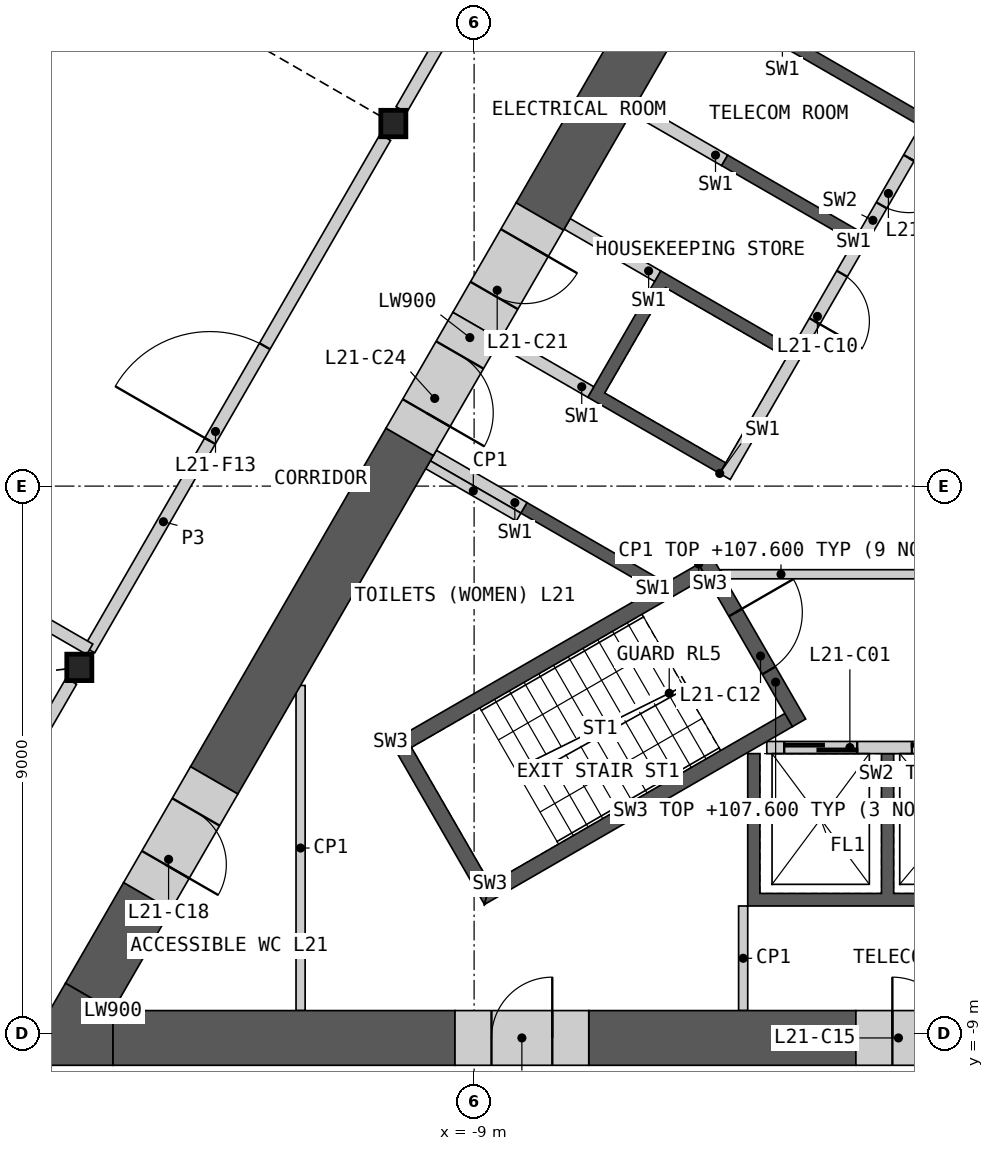
"""IFC4 building model, lengths in metres.
Left out: names, types, materials, properties, quantities, classifications, styles, units other than length and angle.
Written with IfcOpenShell. Run it as: python <this file> out.ifc"""

import sys

from ifc_helpers import new_model, si_unit, direction, frame, frame_2d, origin, origin_2d, place, context, subcontext, project, spatial, polyline, rectangle, i_section, outline, extrude, element, fill, save


model = new_model("IFC4")
c1 = context("Model", 3, precision=1e-05, world=origin(), true_north=direction((0.0, 1.0)))
c2 = subcontext(c1, "Body", "Model", "MODEL_VIEW")
j1 = project(units=[si_unit("LENGTHUNIT", "METRE"), si_unit("PLANEANGLEUNIT", "RADIAN")], contexts=[c1])
p1 = place(None, origin())
s1 = spatial("IfcSite", under=j1, at=p1, CompositionType="ELEMENT")
p2 = place(p1, origin())
s2 = spatial("IfcBuilding", under=s1, at=p2, CompositionType="ELEMENT")
p3 = place(p2, frame((0.0, 0.0, 103.8)))
s3 = spatial("IfcBuildingStorey", under=s2, at=p3, CompositionType="ELEMENT", Elevation=103.8)
for number, where, z_axis, x_axis in (
    (1, (-10.328, 5.963, 0.0), (0.0, 0.0, 1.0), (1.0, 0.0, 0.0)),
    (2, (-15.493, -2.982, 0.0), (0.0, 0.0, 1.0), (1.0, 0.0, 0.0)),
):
    element("IfcColumn", number, at=place(p3, frame(where, z_axis=z_axis, x_axis=x_axis)), inside=s3, PredefinedType="COLUMN", context=c2, shape_type="SweptSolid", body=[
        extrude(i_section(OverallWidth=0.412, OverallDepth=0.435, WebThickness=0.036, FlangeThickness=0.057, at=origin_2d()), origin(), (0.0, 0.0, 1.0), 4.2),
    ])
p4 = place(p3, origin())
e3 = element("IfcWall", 3, at=p4, inside=s3, PredefinedType="SHEAR", context=c2, shape_type="SweptSolid", body=[
    extrude(outline(polyline([(4.5, -4.4), (4.5, -6.906), (-4.5, -6.906), (-4.5, -4.4), (-4.3, -4.4), (-4.3, -6.7), (-2.3, -6.7), (-2.3, -4.4), (-2.1, -4.4), (-2.1, -6.7), (-0.1, -6.7), (-0.1, -4.4), (0.1, -4.4), (0.1, -6.7), (2.1, -6.7), (2.1, -4.4), (2.3, -4.4), (2.3, -6.7), (4.3, -6.7), (4.3, -4.4), (4.5, -4.4)])), origin(), (0.0, 0.0, 1.0), 3.8),
])
p5 = place(p3, frame((-4.187, -4.3, 0.0), z_axis=(0.0, 0.0, 1.0), x_axis=(1.0, 0.0, 0.0)))
e4 = element("IfcWall", 4, at=p5, inside=s3, PredefinedType="SOLIDWALL", context=c2, shape_type="SweptSolid", body=[
    extrude(rectangle(XDim=8.373, YDim=0.2, at=frame_2d((4.187, 0.0))), origin(), (0.0, 0.0, 1.0), 3.8),
])
p6 = place(p5, frame((0.287, 0.0, 0.0)))
e5 = element("IfcOpeningElement", 5, at=p6, cuts=e4, PredefinedType="OPENING", context=c2, shape_type="SweptSolid", body=[
    extrude(rectangle(XDim=1.2, YDim=2.1, at=frame_2d((0.6, 1.05))), frame((0.0, 0.11, 0.0), z_axis=(0.0, -1.0, 0.0), x_axis=(1.0, 0.0, 0.0)), (0.0, 0.0, 1.0), 0.22),
])
p7 = place(p5, frame((2.387, 0.0, 0.0)))
e6 = element("IfcOpeningElement", 6, at=p7, cuts=e4, PredefinedType="OPENING", context=c2, shape_type="SweptSolid", body=[
    extrude(rectangle(XDim=1.4, YDim=2.1, at=frame_2d((0.7, 1.05))), frame((0.0, 0.11, 0.0), z_axis=(0.0, -1.0, 0.0), x_axis=(1.0, 0.0, 0.0)), (0.0, 0.0, 1.0), 0.22),
])
p8 = place(p5, frame((4.737, 0.0, 0.0)))
e7 = element("IfcOpeningElement", 7, at=p8, cuts=e4, PredefinedType="OPENING", context=c2, shape_type="SweptSolid", body=[
    extrude(rectangle(XDim=1.1, YDim=2.1, at=frame_2d((0.55, 1.05))), frame((0.0, 0.11, 0.0), z_axis=(0.0, -1.0, 0.0), x_axis=(1.0, 0.0, 0.0)), (0.0, 0.0, 1.0), 0.22),
])
p9 = place(p5, frame((6.887, 0.0, 0.0)))
e8 = element("IfcOpeningElement", 8, at=p9, cuts=e4, PredefinedType="OPENING", context=c2, shape_type="SweptSolid", body=[
    extrude(rectangle(XDim=1.2, YDim=2.1, at=frame_2d((0.6, 1.05))), frame((0.0, 0.11, 0.0), z_axis=(0.0, -1.0, 0.0), x_axis=(1.0, 0.0, 0.0)), (0.0, 0.0, 1.0), 0.22),
])
p10 = place(p3, origin())
e9 = element("IfcWall", 9, at=p10, inside=s3, PredefinedType="SHEAR", context=c2, shape_type="SweptSolid", body=[
    extrude(outline(polyline([(-6.061, -1.697), (-8.231, -0.444), (-8.131, -0.271), (-5.96, -1.524), (-6.061, -1.697)])), origin(), (0.0, 0.0, 1.0), 3.8),
])
p11 = place(p3, origin())
e10 = element("IfcWall", 10, at=p11, inside=s3, PredefinedType="SHEAR", context=c2, shape_type="SweptSolid", body=[
    extrude(outline(polyline([(-4.96, 0.208), (-7.131, 1.461), (-5.931, 3.54), (-3.76, 2.287), (-3.861, 2.113), (-5.852, 3.263), (-6.852, 1.531), (-4.861, 0.381), (-4.96, 0.208)])), origin(), (0.0, 0.0, 1.0), 3.8),
])
p12 = place(p3, origin())
e11 = element("IfcWall", 11, at=p12, inside=s3, PredefinedType="SHEAR", context=c2, shape_type="SweptSolid", body=[
    extrude(outline(polyline([(-2.76, 4.019), (-4.931, 5.272), (-4.831, 5.445), (-2.66, 4.192), (-2.76, 4.019)])), origin(), (0.0, 0.0, 1.0), 3.8),
])
p13 = place(p3, origin())
e12 = element("IfcWall", 12, at=p13, inside=s3, PredefinedType="SHEAR", context=c2, shape_type="SweptSolid", body=[
    extrude(outline(polyline([(-3.731, 7.35), (-1.561, 6.097), (-1.66, 5.924), (-3.831, 7.177), (-3.731, 7.35)])), origin(), (0.0, 0.0, 1.0), 3.8),
])
p14 = place(p3, frame((-1.631, 5.776, 0.0), z_axis=(0.0, 0.0, 1.0), x_axis=(-0.499992876559, -0.866029516466, 0.0)))
e13 = element("IfcWall", 13, at=p14, inside=s3, PredefinedType="SOLIDWALL", context=c2, shape_type="SweptSolid", body=[
    extrude(rectangle(XDim=6.486, YDim=0.2, at=frame_2d((3.243, 0.0))), origin(), (0.0, 0.0, 1.0), 3.8),
])
p15 = place(p14, frame((0.437, 0.0, 0.0)))
e14 = element("IfcOpeningElement", 14, at=p15, cuts=e13, PredefinedType="OPENING", context=c2, shape_type="SweptSolid", body=[
    extrude(rectangle(XDim=0.9, YDim=2.1, at=frame_2d((0.45, 1.05))), frame((0.0, 0.11, 0.0), z_axis=(0.0, -1.0, 0.0), x_axis=(1.0, 0.0, 0.0)), (0.0, 0.0, 1.0), 0.22),
])
p16 = place(p14, frame((2.637, 0.0, 0.0)))
e15 = element("IfcOpeningElement", 15, at=p16, cuts=e13, PredefinedType="OPENING", context=c2, shape_type="SweptSolid", body=[
    extrude(rectangle(XDim=0.9, YDim=2.1, at=frame_2d((0.45, 1.05))), frame((0.0, 0.11, 0.0), z_axis=(0.0, -1.0, 0.0), x_axis=(1.0, 0.0, 0.0)), (0.0, 0.0, 1.0), 0.22),
])
p17 = place(p3, frame((-4.881, 5.358, 0.0), z_axis=(0.0, 0.0, 1.0), x_axis=(-0.866024871741, 0.500000921525, 0.0)))
e16 = element("IfcWall", 16, at=p17, inside=s3, PredefinedType="SHEAR", context=c2, shape_type="SweptSolid", body=[
    extrude(rectangle(XDim=1.72, YDim=0.2, at=frame_2d((0.86, 0.0))), origin(), (0.0, 0.0, 1.0), 3.8),
])
p18 = place(p3, frame((-5.981, 3.453, 0.0), z_axis=(0.0, 0.0, 1.0), x_axis=(-0.866060346521, 0.499939472521, 0.0)))
e17 = element("IfcWall", 17, at=p18, inside=s3, PredefinedType="SHEAR", context=c2, shape_type="SweptSolid", body=[
    extrude(rectangle(XDim=1.72, YDim=0.2, at=frame_2d((0.86, 0.0))), origin(), (0.0, 0.0, 1.0), 3.8),
])
for number, where, z_axis, x_axis in (
    (18, (-7.081, 1.548, 0.0), (0.0, 0.0, 1.0), (-0.866, 0.5, 0.0)),
    (19, (-8.181, -0.357, 0.0), (0.0, 0.0, 1.0), (-0.866, 0.5, 0.0)),
):
    element("IfcWall", number, at=place(p3, frame(where, z_axis=z_axis, x_axis=x_axis)), inside=s3, PredefinedType="SHEAR", context=c2, shape_type="SweptSolid", body=[
        extrude(rectangle(XDim=1.72, YDim=0.2, at=frame_2d((0.86, 0.0))), origin(), (0.0, 0.0, 1.0), 3.8),
    ])
p19 = place(p3, frame((-4.941, -1.45, 0.0), z_axis=(0.0, 0.0, 1.0), x_axis=(1.0, 0.0, 0.0)))
e20 = element("IfcWall", 20, at=p19, inside=s3, PredefinedType="PARTITIONING", context=c2, shape_type="SweptSolid", body=[
    extrude(rectangle(XDim=9.882, YDim=0.15, at=frame_2d((4.941, 0.0))), origin(), (0.0, 0.0, 1.0), 3.8),
])
p20 = place(p19, frame((4.391, 0.0, 0.0)))
e21 = element("IfcOpeningElement", 21, at=p20, cuts=e20, PredefinedType="OPENING", context=c2, shape_type="SweptSolid", body=[
    extrude(rectangle(XDim=1.1, YDim=2.1, at=frame_2d((0.55, 1.05))), frame((0.0, 0.085, 0.0), z_axis=(0.0, -1.0, 0.0), x_axis=(1.0, 0.0, 0.0)), (0.0, 0.0, 1.0), 0.17),
])
p21 = place(p3, origin())
e22 = element("IfcWall", 22, at=p21, inside=s3, PredefinedType="SHEAR", context=c2, shape_type="SweptSolid", body=[
    extrude(outline(polyline([(-5.307, -1.281), (-10.374, -4.206), (-10.032, -4.298), (-5.182, -1.498), (-5.307, -1.281)])), origin(), (0.0, 0.0, 1.0), 3.8),
])
p22 = place(p3, origin())
e23 = element("IfcWall", 23, at=p22, inside=s3, PredefinedType="SHEAR", context=c2, shape_type="SweptSolid", body=[
    extrude(outline(polyline([(-10.374, -4.206), (-8.83, -6.881), (-8.738, -6.539), (-10.032, -4.298), (-10.374, -4.206)])), origin(), (0.0, 0.0, 1.0), 3.8),
])
p23 = place(p3, origin())
e24 = element("IfcWall", 24, at=p23, inside=s3, PredefinedType="SHEAR", context=c2, shape_type="SweptSolid", body=[
    extrude(outline(polyline([(-8.738, -6.539), (-8.83, -6.881), (-3.763, -3.956), (-3.888, -3.739), (-8.738, -6.539)])), origin(), (0.0, 0.0, 1.0), 3.8),
])
p24 = place(p3, frame((-5.199, -1.219, 0.0), z_axis=(0.0, 0.0, 1.0), x_axis=(0.499982516597, -0.866035497597, 0.0)))
e25 = element("IfcWall", 25, at=p24, inside=s3, PredefinedType="SHEAR", context=c2, shape_type="SweptSolid", body=[
    extrude(rectangle(XDim=3.088, YDim=0.25, at=frame_2d((1.544, 0.0))), origin(), (0.0, 0.0, 1.0), 3.8),
])
p25 = place(p24, frame((0.994, 0.0, 0.0)))
e26 = element("IfcOpeningElement", 26, at=p25, cuts=e25, PredefinedType="OPENING", context=c2, shape_type="SweptSolid", body=[
    extrude(rectangle(XDim=1.1, YDim=2.1, at=frame_2d((0.55, 1.05))), frame((0.0, 0.135, 0.0), z_axis=(0.0, -1.0, 0.0), x_axis=(1.0, 0.0, 0.0)), (0.0, 0.0, 1.0), 0.27),
])
for number, where, z_axis, x_axis in (
    (27, (-8.268, -0.509, 0.0), (0.0, 0.0, 1.0), (-0.866, 0.5, 0.0)),
    (28, (-4.575, -6.906, 0.0), (0.0, 0.0, 1.0), (0.0, -1.0, 0.0)),
):
    element("IfcWall", number, at=place(p3, frame(where, z_axis=z_axis, x_axis=x_axis)), inside=s3, PredefinedType="PARTITIONING", context=c2, shape_type="SweptSolid", body=[
        extrude(rectangle(XDim=1.72, YDim=0.15, at=frame_2d((0.86, 0.0))), origin(), (0.0, 0.0, 1.0), 3.8),
    ])
p26 = place(p3, frame((-11.854, -8.626, 0.0), z_axis=(0.0, 0.0, 1.0), x_axis=(0.0, 1.0, 0.0)))
e29 = element("IfcWall", 29, at=p26, inside=s3, PredefinedType="PARTITIONING", context=c2, shape_type="SweptSolid", body=[
    extrude(rectangle(XDim=5.347, YDim=0.15, at=frame_2d((2.674, 0.0))), origin(), (0.0, 0.0, 1.0), 3.8),
])
p27 = place(p3, frame((-14.941, -9.076, 0.0), z_axis=(0.0, 0.0, 1.0), x_axis=(1.0, 0.0, 0.0)))
e30 = element("IfcWall", 30, at=p27, inside=s3, PredefinedType="SHEAR", context=c2, shape_type="SweptSolid", body=[
    extrude(rectangle(XDim=5.627, YDim=0.9, at=frame_2d((2.813, 0.0))), origin(), (0.0, 0.0, 1.0), 3.8),
])
p28 = place(p3, frame((-7.115, -9.076, 0.0), z_axis=(0.0, 0.0, 1.0), x_axis=(1.0, 0.0, 0.0)))
e31 = element("IfcWall", 31, at=p28, inside=s3, PredefinedType="SHEAR", context=c2, shape_type="SweptSolid", body=[
    extrude(rectangle(XDim=4.393, YDim=0.9, at=frame_2d((2.197, 0.0))), origin(), (0.0, 0.0, 1.0), 3.8),
])
p29 = place(p3, frame((-3.512, 12.069, 0.0), z_axis=(0.0, 0.0, 1.0), x_axis=(-0.500002126466, -0.866024176065, 0.0)))
e32 = element("IfcWall", 32, at=p29, inside=s3, PredefinedType="SHEAR", context=c2, shape_type="SweptSolid", body=[
    extrude(rectangle(XDim=8.816, YDim=0.9, at=frame_2d((4.408, 0.0))), origin(), (0.0, 0.0, 1.0), 3.8),
])
p30 = place(p3, frame((-10.06, 0.728, 0.0), z_axis=(0.0, 0.0, 1.0), x_axis=(-0.500002975332, -0.866023685969, 0.0)))
e33 = element("IfcWall", 33, at=p30, inside=s3, PredefinedType="SHEAR", context=c2, shape_type="SweptSolid", body=[
    extrude(rectangle(XDim=6.429, YDim=0.9, at=frame_2d((3.214, 0.0))), origin(), (0.0, 0.0, 1.0), 3.8),
])
p31 = place(p3, frame((-14.375, -6.745, 0.0), z_axis=(0.0, 0.0, 1.0), x_axis=(-0.499928740635, -0.866066541489, 0.0)))
e34 = element("IfcWall", 34, at=p31, inside=s3, PredefinedType="SHEAR", context=c2, shape_type="SweptSolid", body=[
    extrude(rectangle(XDim=1.912, YDim=0.9, at=frame_2d((0.956, 0.0))), origin(), (0.0, 0.0, 1.0), 3.8),
])
p32 = place(p3, origin())
e35 = element("IfcWall", 35, at=p32, inside=s3, PredefinedType="SHEAR", context=c2, shape_type="SweptSolid", body=[
    extrude(outline(polyline([(-14.941, -8.626), (-14.941, -9.526), (-16.5, -9.526), (-15.721, -8.176), (-14.941, -8.626)])), origin(), (0.0, 0.0, 1.0), 3.8),
])
p33 = place(p3, frame((-2.721, -9.076, 0.0), z_axis=(0.0, 0.0, 1.0), x_axis=(1.0, 0.0, 0.0)))
e36 = element("IfcWall", 36, at=p33, inside=s3, PredefinedType="SHEAR", context=c2, shape_type="SweptSolid", body=[
    extrude(rectangle(XDim=2.2, YDim=0.9, at=frame_2d((1.1, 0.0))), origin(), (0.0, 0.0, 1.0), 3.8),
])
p34 = place(p33, frame((0.6, 0.0, 0.0)))
e37 = element("IfcOpeningElement", 37, at=p34, cuts=e36, PredefinedType="OPENING", context=c2, shape_type="SweptSolid", body=[
    extrude(rectangle(XDim=1.0, YDim=2.1, at=frame_2d((0.5, 1.05))), frame((0.0, 0.46, 0.0), z_axis=(0.0, -1.0, 0.0), x_axis=(1.0, 0.0, 0.0)), (0.0, 0.0, 1.0), 0.92),
])
p35 = place(p3, frame((-13.275, -4.84, 0.0), z_axis=(0.0, 0.0, 1.0), x_axis=(-0.50002983664, -0.866008176907, 0.0)))
e38 = element("IfcWall", 38, at=p35, inside=s3, PredefinedType="SHEAR", context=c2, shape_type="SweptSolid", body=[
    extrude(rectangle(XDim=2.2, YDim=0.9, at=frame_2d((1.1, 0.0))), origin(), (0.0, 0.0, 1.0), 3.8),
])
p36 = place(p35, frame((0.6, 0.0, 0.0)))
e39 = element("IfcOpeningElement", 39, at=p36, cuts=e38, PredefinedType="OPENING", context=c2, shape_type="SweptSolid", body=[
    extrude(rectangle(XDim=1.0, YDim=2.1, at=frame_2d((0.5, 1.05))), frame((0.0, 0.46, 0.0), z_axis=(0.0, -1.0, 0.0), x_axis=(1.0, 0.0, 0.0)), (0.0, 0.0, 1.0), 0.92),
])
p37 = place(p3, frame((-9.314, -9.076, 0.0), z_axis=(0.0, 0.0, 1.0), x_axis=(1.0, 0.0, 0.0)))
e40 = element("IfcWall", 40, at=p37, inside=s3, PredefinedType="SHEAR", context=c2, shape_type="SweptSolid", body=[
    extrude(rectangle(XDim=2.2, YDim=0.9, at=frame_2d((1.1, 0.0))), origin(), (0.0, 0.0, 1.0), 3.8),
])
p38 = place(p37, frame((0.6, 0.0, 0.0)))
e41 = element("IfcOpeningElement", 41, at=p38, cuts=e40, PredefinedType="OPENING", context=c2, shape_type="SweptSolid", body=[
    extrude(rectangle(XDim=1.0, YDim=2.1, at=frame_2d((0.5, 1.05))), frame((0.0, 0.46, 0.0), z_axis=(0.0, -1.0, 0.0), x_axis=(1.0, 0.0, 0.0)), (0.0, 0.0, 1.0), 0.92),
])
p39 = place(p3, frame((-7.92, 4.434, 0.0), z_axis=(0.0, 0.0, 1.0), x_axis=(-0.499939227269, -0.866060488094, 0.0)))
e42 = element("IfcWall", 42, at=p39, inside=s3, PredefinedType="SHEAR", context=c2, shape_type="SweptSolid", body=[
    extrude(rectangle(XDim=2.08, YDim=0.9, at=frame_2d((1.04, 0.0))), origin(), (0.0, 0.0, 1.0), 3.8),
])
p40 = place(p39, frame((0.5, 0.0, 0.0)))
e43 = element("IfcOpeningElement", 43, at=p40, cuts=e42, PredefinedType="OPENING", context=c2, shape_type="SweptSolid", body=[
    extrude(rectangle(XDim=1.0, YDim=2.1, at=frame_2d((0.5, 1.05))), frame((0.0, 0.46, 0.0), z_axis=(0.0, -1.0, 0.0), x_axis=(1.0, 0.0, 0.0)), (0.0, 0.0, 1.0), 0.92),
])
p41 = place(p3, frame((-8.96, 2.633, 0.0), z_axis=(0.0, 0.0, 1.0), x_axis=(-0.50002983664, -0.866008176907, 0.0)))
e44 = element("IfcWall", 44, at=p41, inside=s3, PredefinedType="SHEAR", context=c2, shape_type="SweptSolid", body=[
    extrude(rectangle(XDim=2.2, YDim=0.9, at=frame_2d((1.1, 0.0))), origin(), (0.0, 0.0, 1.0), 3.8),
])
p42 = place(p41, frame((0.55, 0.0, 0.0)))
e45 = element("IfcOpeningElement", 45, at=p42, cuts=e44, PredefinedType="OPENING", context=c2, shape_type="SweptSolid", body=[
    extrude(rectangle(XDim=1.1, YDim=2.1, at=frame_2d((0.55, 1.05))), frame((0.0, 0.46, 0.0), z_axis=(0.0, -1.0, 0.0), x_axis=(1.0, 0.0, 0.0)), (0.0, 0.0, 1.0), 0.92),
])
p43 = place(p3, frame((-10.197, 6.19, 0.0), z_axis=(0.0, 0.0, 1.0), x_axis=(0.500012035596, 0.866018454918, 0.0)))
e46 = element("IfcWall", 46, at=p43, inside=s3, PredefinedType="PARTITIONING", context=c2, shape_type="SweptSolid", body=[
    extrude(rectangle(XDim=9.803, YDim=0.2, at=frame_2d((4.902, 0.0))), origin(), (0.0, 0.0, 1.0), 3.8),
])
p44 = place(p3, frame((-15.326, -2.693, 0.0), z_axis=(0.0, 0.0, 1.0), x_axis=(0.500010522431, 0.866019328571, 0.0)))
e47 = element("IfcWall", 47, at=p44, inside=s3, PredefinedType="PARTITIONING", context=c2, shape_type="SweptSolid", body=[
    extrude(rectangle(XDim=9.733, YDim=0.2, at=frame_2d((4.866, 0.0))), origin(), (0.0, 0.0, 1.0), 3.8),
])
p45 = place(p44, frame((3.966, 0.0, 0.0)))
e48 = element("IfcOpeningElement", 48, at=p45, cuts=e47, PredefinedType="OPENING", context=c2, shape_type="SweptSolid", body=[
    extrude(rectangle(XDim=1.8, YDim=2.1, at=frame_2d((0.9, 1.05))), frame((0.0, 0.11, 0.0), z_axis=(0.0, -1.0, 0.0), x_axis=(1.0, 0.0, 0.0)), (0.0, 0.0, 1.0), 0.22),
])
p46 = place(p3, frame((-18.744, -8.613, 0.0), z_axis=(0.0, 0.0, 1.0), x_axis=(0.499997920671, 0.866026604282, 0.0)))
e49 = element("IfcWall", 49, at=p46, inside=s3, PredefinedType="PARTITIONING", context=c2, shape_type="SweptSolid", body=[
    extrude(rectangle(XDim=6.24, YDim=0.2, at=frame_2d((3.12, 0.0))), origin(), (0.0, 0.0, 1.0), 3.8),
])
p47 = place(p46, frame((2.67, 0.0, 0.0)))
e50 = element("IfcOpeningElement", 50, at=p47, cuts=e49, PredefinedType="OPENING", context=c2, shape_type="SweptSolid", body=[
    extrude(rectangle(XDim=1.0, YDim=2.1, at=frame_2d((0.5, 1.05))), frame((0.0, 0.11, 0.0), z_axis=(0.0, -1.0, 0.0), x_axis=(1.0, 0.0, 0.0)), (0.0, 0.0, 1.0), 0.22),
])
p48 = place(p3, frame((-26.636, 3.848, 0.0), z_axis=(0.0, 0.0, 1.0), x_axis=(0.866029068465, -0.499993652534, 0.0)))
e51 = element("IfcWall", 51, at=p48, inside=s3, PredefinedType="PARTITIONING", context=c2, shape_type="SweptSolid", body=[
    extrude(rectangle(XDim=13.066, YDim=0.2, at=frame_2d((6.533, 0.0))), origin(), (0.0, 0.0, 1.0), 2.885),
])
p49 = place(p6, origin())
e52 = element("IfcDoor", 52, at=p49, inside=s3, OperationType="SLIDING_TO_LEFT", PredefinedType="DOOR", context=c2, shape_type="SweptSolid", body=[
    extrude(rectangle(XDim=1.2, YDim=2.1, at=frame_2d((0.6, 1.05))), frame((0.0, 0.025, 0.0), z_axis=(0.0, -1.0, 0.0), x_axis=(1.0, 0.0, 0.0)), (0.0, 0.0, 1.0), 0.05),
])
fill(e5, e52)
p50 = place(p7, origin())
e53 = element("IfcDoor", 53, at=p50, inside=s3, OperationType="SLIDING_TO_LEFT", PredefinedType="DOOR", context=c2, shape_type="SweptSolid", body=[
    extrude(rectangle(XDim=1.4, YDim=2.1, at=frame_2d((0.7, 1.05))), frame((0.0, 0.025, 0.0), z_axis=(0.0, -1.0, 0.0), x_axis=(1.0, 0.0, 0.0)), (0.0, 0.0, 1.0), 0.05),
])
fill(e6, e53)
p51 = place(p15, origin())
e54 = element("IfcDoor", 54, at=p51, inside=s3, OperationType="SINGLE_SWING_LEFT", PredefinedType="DOOR", context=c2, shape_type="SweptSolid", body=[
    extrude(rectangle(XDim=0.9, YDim=2.1, at=frame_2d((0.45, 1.05))), frame((0.0, 0.025, 0.0), z_axis=(0.0, -1.0, 0.0), x_axis=(1.0, 0.0, 0.0)), (0.0, 0.0, 1.0), 0.05),
])
fill(e14, e54)
p52 = place(p16, origin())
e55 = element("IfcDoor", 55, at=p52, inside=s3, OperationType="SINGLE_SWING_RIGHT", PredefinedType="DOOR", context=c2, shape_type="SweptSolid", body=[
    extrude(rectangle(XDim=0.9, YDim=2.1, at=frame_2d((0.45, 1.05))), frame((0.0, 0.025, 0.0), z_axis=(0.0, -1.0, 0.0), x_axis=(1.0, 0.0, 0.0)), (0.0, 0.0, 1.0), 0.05),
])
fill(e15, e55)
p53 = place(p25, origin())
e56 = element("IfcDoor", 56, at=p53, inside=s3, OperationType="SINGLE_SWING_LEFT", PredefinedType="DOOR", context=c2, shape_type="SweptSolid", body=[
    extrude(rectangle(XDim=1.1, YDim=2.1, at=frame_2d((0.55, 1.05))), frame((0.0, 0.025, 0.0), z_axis=(0.0, -1.0, 0.0), x_axis=(1.0, 0.0, 0.0)), (0.0, 0.0, 1.0), 0.05),
])
fill(e26, e56)
p54 = place(p34, origin())
e57 = element("IfcDoor", 57, at=p54, inside=s3, OperationType="SINGLE_SWING_LEFT", PredefinedType="DOOR", context=c2, shape_type="SweptSolid", body=[
    extrude(rectangle(XDim=1.0, YDim=2.1, at=frame_2d((0.5, 1.05))), frame((0.0, 0.205, 0.0), z_axis=(0.0, -1.0, 0.0), x_axis=(1.0, 0.0, 0.0)), (0.0, 0.0, 1.0), 0.05),
])
fill(e37, e57)
p55 = place(p36, origin())
e58 = element("IfcDoor", 58, at=p55, inside=s3, OperationType="SINGLE_SWING_RIGHT", PredefinedType="DOOR", context=c2, shape_type="SweptSolid", body=[
    extrude(rectangle(XDim=1.0, YDim=2.1, at=frame_2d((0.5, 1.05))), frame((0.0, 0.205, 0.0), z_axis=(0.0, -1.0, 0.0), x_axis=(1.0, 0.0, 0.0)), (0.0, 0.0, 1.0), 0.05),
])
fill(e39, e58)
p56 = place(p38, origin())
e59 = element("IfcDoor", 59, at=p56, inside=s3, OperationType="SINGLE_SWING_RIGHT", PredefinedType="DOOR", context=c2, shape_type="SweptSolid", body=[
    extrude(rectangle(XDim=1.0, YDim=2.1, at=frame_2d((0.5, 1.05))), frame((0.0, 0.205, 0.0), z_axis=(0.0, -1.0, 0.0), x_axis=(1.0, 0.0, 0.0)), (0.0, 0.0, 1.0), 0.05),
])
fill(e41, e59)
p57 = place(p40, origin())
e60 = element("IfcDoor", 60, at=p57, inside=s3, OperationType="SINGLE_SWING_LEFT", PredefinedType="DOOR", context=c2, shape_type="SweptSolid", body=[
    extrude(rectangle(XDim=1.0, YDim=2.1, at=frame_2d((0.5, 1.05))), frame((0.0, 0.205, 0.0), z_axis=(0.0, -1.0, 0.0), x_axis=(1.0, 0.0, 0.0)), (0.0, 0.0, 1.0), 0.05),
])
fill(e43, e60)
p58 = place(p42, origin())
e61 = element("IfcDoor", 61, at=p58, inside=s3, OperationType="SINGLE_SWING_RIGHT", PredefinedType="DOOR", context=c2, shape_type="SweptSolid", body=[
    extrude(rectangle(XDim=1.1, YDim=2.1, at=frame_2d((0.55, 1.05))), frame((0.0, 0.205, 0.0), z_axis=(0.0, -1.0, 0.0), x_axis=(1.0, 0.0, 0.0)), (0.0, 0.0, 1.0), 0.05),
])
fill(e45, e61)
p59 = place(p45, origin())
e62 = element("IfcDoor", 62, at=p59, inside=s3, OperationType="DOUBLE_DOOR_SINGLE_SWING", PredefinedType="DOOR", context=c2, shape_type="SweptSolid", body=[
    extrude(rectangle(XDim=1.8, YDim=2.1, at=frame_2d((0.9, 1.05))), frame((0.0, 0.025, 0.0), z_axis=(0.0, -1.0, 0.0), x_axis=(1.0, 0.0, 0.0)), (0.0, 0.0, 1.0), 0.05),
])
fill(e48, e62)
save(model, sys.argv[1])
